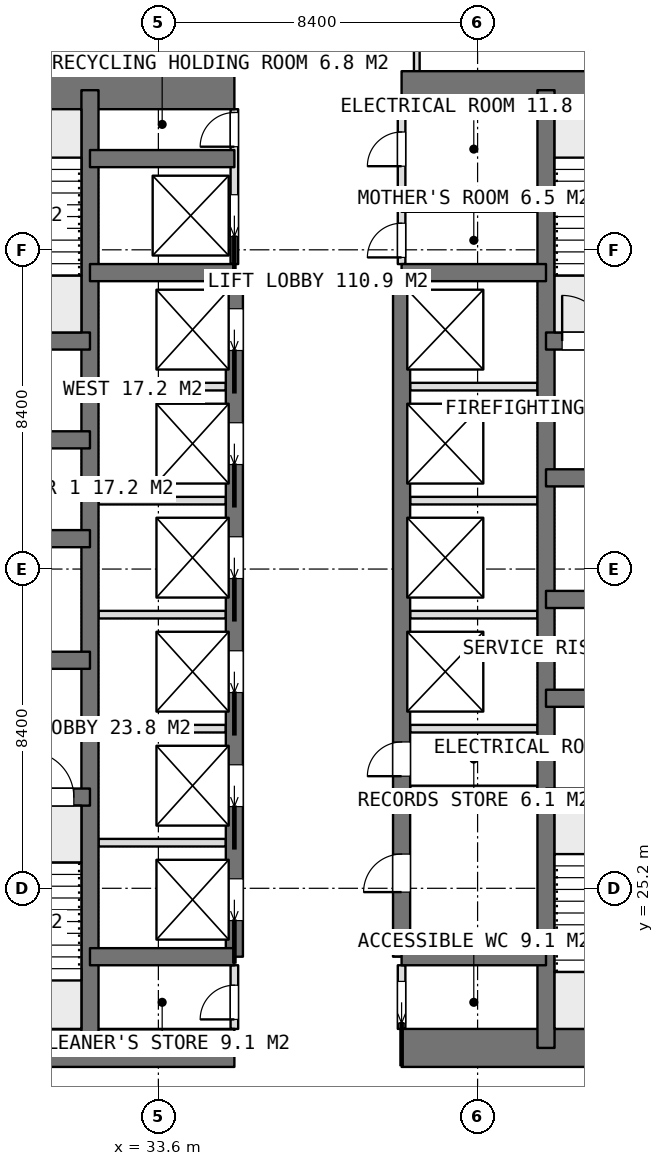
"""IFC4 building model, lengths in metres.
Left out: names, types, materials, properties, quantities, classifications, styles, units other than length and angle.
Written with IfcOpenShell. Run it as: python <this file> out.ifc"""

import sys

from ifc_helpers import new_model, si_unit, direction, frame, frame_2d, origin, place, context, subcontext, project, spatial, rectangle, extrude, element, fill, save


model = new_model("IFC4")
c1 = context("Model", 3, precision=1e-05, world=origin(), true_north=direction((0.0, 1.0)))
c2 = subcontext(c1, "Body", "Model", "MODEL_VIEW")
j1 = project(units=[si_unit("LENGTHUNIT", "METRE"), si_unit("PLANEANGLEUNIT", "RADIAN")], contexts=[c1])
p1 = place(None, origin())
s1 = spatial("IfcSite", under=j1, at=p1, CompositionType="ELEMENT")
p2 = place(p1, origin())
s2 = spatial("IfcBuilding", under=s1, at=p2, CompositionType="ELEMENT")
p3 = place(p2, frame((0.0, 0.0, 121.55)))
s3 = spatial("IfcBuildingStorey", under=s2, at=p3, CompositionType="ELEMENT", Elevation=121.55)
p4 = place(p3, frame((25.2, 21.0, 0.0), z_axis=(0.0, 0.0, 1.0), x_axis=(1.0, 0.0, 0.0)))
e1 = element("IfcWall", 1, at=p4, inside=s3, PredefinedType="SHEAR", context=c2, shape_type="SweptSolid", body=[
    extrude(rectangle(XDim=10.4, YDim=1.0, at=frame_2d((5.2, 0.0))), origin(), (0.0, 0.0, 1.0), 3.75),
])
p5 = place(p3, frame((40.0, 21.0, 0.0), z_axis=(0.0, 0.0, 1.0), x_axis=(1.0, 0.0, 0.0)))
e2 = element("IfcWall", 2, at=p5, inside=s3, PredefinedType="SHEAR", context=c2, shape_type="SweptSolid", body=[
    extrude(rectangle(XDim=10.4, YDim=1.0, at=frame_2d((5.2, 0.0))), origin(), (0.0, 0.0, 1.0), 3.75),
])
p6 = place(p3, frame((25.2, 46.2, 0.0), z_axis=(0.0, 0.0, 1.0), x_axis=(1.0, 0.0, 0.0)))
e3 = element("IfcWall", 3, at=p6, inside=s3, PredefinedType="SHEAR", context=c2, shape_type="SweptSolid", body=[
    extrude(rectangle(XDim=10.4, YDim=1.0, at=frame_2d((5.2, 0.0))), origin(), (0.0, 0.0, 1.0), 3.75),
])
p7 = place(p3, frame((40.0, 46.2, 0.0), z_axis=(0.0, 0.0, 1.0), x_axis=(1.0, 0.0, 0.0)))
e4 = element("IfcWall", 4, at=p7, inside=s3, PredefinedType="SHEAR", context=c2, shape_type="SweptSolid", body=[
    extrude(rectangle(XDim=10.4, YDim=1.0, at=frame_2d((5.2, 0.0))), origin(), (0.0, 0.0, 1.0), 3.75),
])
for number, where, z_axis, x_axis in (
    (5, (31.8, 21.0, 0.0), (0.0, 0.0, 1.0), (0.0, 1.0, 0.0)),
    (6, (43.8, 21.0, 0.0), (0.0, 0.0, 1.0), (0.0, 1.0, 0.0)),
):
    element("IfcWall", number, at=place(p3, frame(where, z_axis=z_axis, x_axis=x_axis)), inside=s3, PredefinedType="SHEAR", context=c2, shape_type="SweptSolid", body=[
        extrude(rectangle(XDim=25.2, YDim=0.45, at=frame_2d((12.6, 0.0))), origin(), (0.0, 0.0, 1.0), 3.75),
    ])
p8 = place(p3, frame((35.6, 23.4, 0.0), z_axis=(0.0, 0.0, 1.0), x_axis=(0.0, 1.0, 0.0)))
e7 = element("IfcWall", 7, at=p8, inside=s3, PredefinedType="SHEAR", context=c2, shape_type="SweptSolid", body=[
    extrude(rectangle(XDim=18.0, YDim=0.45, at=frame_2d((9.0, 0.0))), origin(), (0.0, 0.0, 1.0), 3.75),
])
p9 = place(p8, frame((0.95, 0.0, 0.0)))
e8 = element("IfcOpeningElement", 8, at=p9, cuts=e7, PredefinedType="OPENING", context=c2, shape_type="SweptSolid", body=[
    extrude(rectangle(XDim=1.1, YDim=2.1, at=frame_2d((0.55, 1.05))), frame((0.0, 0.235, 0.0), z_axis=(0.0, -1.0, 0.0), x_axis=(1.0, 0.0, 0.0)), (0.0, 0.0, 1.0), 0.47),
])
p10 = place(p8, frame((3.95, 0.0, 0.0)))
e9 = element("IfcOpeningElement", 9, at=p10, cuts=e7, PredefinedType="OPENING", context=c2, shape_type="SweptSolid", body=[
    extrude(rectangle(XDim=1.1, YDim=2.1, at=frame_2d((0.55, 1.05))), frame((0.0, 0.235, 0.0), z_axis=(0.0, -1.0, 0.0), x_axis=(1.0, 0.0, 0.0)), (0.0, 0.0, 1.0), 0.47),
])
p11 = place(p8, frame((6.95, 0.0, 0.0)))
e10 = element("IfcOpeningElement", 10, at=p11, cuts=e7, PredefinedType="OPENING", context=c2, shape_type="SweptSolid", body=[
    extrude(rectangle(XDim=1.1, YDim=2.1, at=frame_2d((0.55, 1.05))), frame((0.0, 0.235, 0.0), z_axis=(0.0, -1.0, 0.0), x_axis=(1.0, 0.0, 0.0)), (0.0, 0.0, 1.0), 0.47),
])
p12 = place(p8, frame((9.95, 0.0, 0.0)))
e11 = element("IfcOpeningElement", 11, at=p12, cuts=e7, PredefinedType="OPENING", context=c2, shape_type="SweptSolid", body=[
    extrude(rectangle(XDim=1.1, YDim=2.1, at=frame_2d((0.55, 1.05))), frame((0.0, 0.235, 0.0), z_axis=(0.0, -1.0, 0.0), x_axis=(1.0, 0.0, 0.0)), (0.0, 0.0, 1.0), 0.47),
])
p13 = place(p8, frame((12.95, 0.0, 0.0)))
e12 = element("IfcOpeningElement", 12, at=p13, cuts=e7, PredefinedType="OPENING", context=c2, shape_type="SweptSolid", body=[
    extrude(rectangle(XDim=1.1, YDim=2.1, at=frame_2d((0.55, 1.05))), frame((0.0, 0.235, 0.0), z_axis=(0.0, -1.0, 0.0), x_axis=(1.0, 0.0, 0.0)), (0.0, 0.0, 1.0), 0.47),
])
p14 = place(p8, frame((15.95, 0.0, 0.0)))
e13 = element("IfcOpeningElement", 13, at=p14, cuts=e7, PredefinedType="OPENING", context=c2, shape_type="SweptSolid", body=[
    extrude(rectangle(XDim=1.1, YDim=2.1, at=frame_2d((0.55, 1.05))), frame((0.0, 0.235, 0.0), z_axis=(0.0, -1.0, 0.0), x_axis=(1.0, 0.0, 0.0)), (0.0, 0.0, 1.0), 0.47),
])
p15 = place(p3, frame((40.0, 23.4, 0.0), z_axis=(0.0, 0.0, 1.0), x_axis=(0.0, 1.0, 0.0)))
e14 = element("IfcWall", 14, at=p15, inside=s3, PredefinedType="SHEAR", context=c2, shape_type="SweptSolid", body=[
    extrude(rectangle(XDim=18.0, YDim=0.45, at=frame_2d((9.0, 0.0))), origin(), (0.0, 0.0, 1.0), 3.75),
])
p16 = place(p15, frame((1.7, 0.0, 0.0)))
e15 = element("IfcOpeningElement", 15, at=p16, cuts=e14, PredefinedType="OPENING", context=c2, shape_type="SweptSolid", body=[
    extrude(rectangle(XDim=1.0, YDim=2.1, at=frame_2d((0.5, 1.05))), frame((0.0, 0.235, 0.0), z_axis=(0.0, -1.0, 0.0), x_axis=(1.0, 0.0, 0.0)), (0.0, 0.0, 1.0), 0.47),
])
p17 = place(p15, frame((4.75, 0.0, 0.0)))
e16 = element("IfcOpeningElement", 16, at=p17, cuts=e14, PredefinedType="OPENING", context=c2, shape_type="SweptSolid", body=[
    extrude(rectangle(XDim=0.9, YDim=2.1, at=frame_2d((0.45, 1.05))), frame((0.0, 0.235, 0.0), z_axis=(0.0, -1.0, 0.0), x_axis=(1.0, 0.0, 0.0)), (0.0, 0.0, 1.0), 0.47),
])
for number, where, z_axis, x_axis in (
    (17, (31.8, 23.4, 0.0), (0.0, 0.0, 1.0), (1.0, 0.0, 0.0)),
    (18, (31.8, 41.4, 0.0), (0.0, 0.0, 1.0), (1.0, 0.0, 0.0)),
    (19, (31.8, 44.4, 0.0), (0.0, 0.0, 1.0), (1.0, 0.0, 0.0)),
    (20, (40.0, 23.4, 0.0), (0.0, 0.0, 1.0), (1.0, 0.0, 0.0)),
    (21, (40.0, 41.4, 0.0), (0.0, 0.0, 1.0), (1.0, 0.0, 0.0)),
):
    element("IfcWall", number, at=place(p3, frame(where, z_axis=z_axis, x_axis=x_axis)), inside=s3, PredefinedType="SHEAR", context=c2, shape_type="SweptSolid", body=[
        extrude(rectangle(XDim=3.8, YDim=0.45, at=frame_2d((1.9, 0.0))), origin(), (0.0, 0.0, 1.0), 3.75),
    ])
p18 = place(p3, frame((25.2, 27.6, 0.0), z_axis=(0.0, 0.0, 1.0), x_axis=(1.0, 0.0, 0.0)))
e22 = element("IfcWall", 22, at=p18, inside=s3, PredefinedType="SHEAR", context=c2, shape_type="SweptSolid", body=[
    extrude(rectangle(XDim=6.6, YDim=0.45, at=frame_2d((3.3, 0.0))), origin(), (0.0, 0.0, 1.0), 3.75),
])
p19 = place(p18, frame((4.975, 0.0, 0.0)))
e23 = element("IfcOpeningElement", 23, at=p19, cuts=e22, PredefinedType="OPENING", context=c2, shape_type="SweptSolid", body=[
    extrude(rectangle(XDim=1.2, YDim=2.1, at=frame_2d((0.6, 1.05))), frame((0.0, 0.235, 0.0), z_axis=(0.0, -1.0, 0.0), x_axis=(1.0, 0.0, 0.0)), (0.0, 0.0, 1.0), 0.47),
])
p20 = place(p3, frame((25.2, 31.2, 0.0), z_axis=(0.0, 0.0, 1.0), x_axis=(1.0, 0.0, 0.0)))
e24 = element("IfcWall", 24, at=p20, inside=s3, PredefinedType="SHEAR", context=c2, shape_type="SweptSolid", body=[
    extrude(rectangle(XDim=6.6, YDim=0.45, at=frame_2d((3.3, 0.0))), origin(), (0.0, 0.0, 1.0), 3.75),
])
p21 = place(p20, frame((2.65, 0.0, 0.0)))
e25 = element("IfcOpeningElement", 25, at=p21, cuts=e24, PredefinedType="OPENING", context=c2, shape_type="SweptSolid", body=[
    extrude(rectangle(XDim=1.3, YDim=2.1, at=frame_2d((0.65, 1.05))), frame((0.0, 0.235, 0.0), z_axis=(0.0, -1.0, 0.0), x_axis=(1.0, 0.0, 0.0)), (0.0, 0.0, 1.0), 0.47),
])
for number, where, z_axis, x_axis in (
    (26, (25.2, 34.4, 0.0), (0.0, 0.0, 1.0), (1.0, 0.0, 0.0)),
    (27, (25.2, 37.0, 0.0), (0.0, 0.0, 1.0), (1.0, 0.0, 0.0)),
    (28, (25.2, 39.6, 0.0), (0.0, 0.0, 1.0), (1.0, 0.0, 0.0)),
):
    element("IfcWall", number, at=place(p3, frame(where, z_axis=z_axis, x_axis=x_axis)), inside=s3, PredefinedType="SHEAR", context=c2, shape_type="SweptSolid", body=[
        extrude(rectangle(XDim=6.6, YDim=0.45, at=frame_2d((3.3, 0.0))), origin(), (0.0, 0.0, 1.0), 3.75),
    ])
for number, where, z_axis, x_axis in (
    (29, (43.8, 27.6, 0.0), (0.0, 0.0, 1.0), (1.0, 0.0, 0.0)),
    (30, (43.8, 30.2, 0.0), (0.0, 0.0, 1.0), (1.0, 0.0, 0.0)),
    (31, (43.8, 32.8, 0.0), (0.0, 0.0, 1.0), (1.0, 0.0, 0.0)),
):
    element("IfcWall", number, at=place(p3, frame(where, z_axis=z_axis, x_axis=x_axis)), inside=s3, PredefinedType="SHEAR", context=c2, shape_type="SweptSolid", body=[
        extrude(rectangle(XDim=6.6, YDim=0.45, at=frame_2d((3.3, 0.0))), origin(), (0.0, 0.0, 1.0), 3.75),
    ])
p22 = place(p3, frame((43.8, 36.0, 0.0), z_axis=(0.0, 0.0, 1.0), x_axis=(1.0, 0.0, 0.0)))
e32 = element("IfcWall", 32, at=p22, inside=s3, PredefinedType="SHEAR", context=c2, shape_type="SweptSolid", body=[
    extrude(rectangle(XDim=6.6, YDim=0.45, at=frame_2d((3.3, 0.0))), origin(), (0.0, 0.0, 1.0), 3.75),
])
p23 = place(p22, frame((2.65, 0.0, 0.0)))
e33 = element("IfcOpeningElement", 33, at=p23, cuts=e32, PredefinedType="OPENING", context=c2, shape_type="SweptSolid", body=[
    extrude(rectangle(XDim=1.3, YDim=2.1, at=frame_2d((0.65, 1.05))), frame((0.0, 0.235, 0.0), z_axis=(0.0, -1.0, 0.0), x_axis=(1.0, 0.0, 0.0)), (0.0, 0.0, 1.0), 0.47),
])
p24 = place(p3, frame((43.8, 39.6, 0.0), z_axis=(0.0, 0.0, 1.0), x_axis=(1.0, 0.0, 0.0)))
e34 = element("IfcWall", 34, at=p24, inside=s3, PredefinedType="SHEAR", context=c2, shape_type="SweptSolid", body=[
    extrude(rectangle(XDim=6.6, YDim=0.45, at=frame_2d((3.3, 0.0))), origin(), (0.0, 0.0, 1.0), 3.75),
])
p25 = place(p24, frame((0.425, 0.0, 0.0)))
e35 = element("IfcOpeningElement", 35, at=p25, cuts=e34, PredefinedType="OPENING", context=c2, shape_type="SweptSolid", body=[
    extrude(rectangle(XDim=1.2, YDim=2.1, at=frame_2d((0.6, 1.05))), frame((0.0, 0.235, 0.0), z_axis=(0.0, -1.0, 0.0), x_axis=(1.0, 0.0, 0.0)), (0.0, 0.0, 1.0), 0.47),
])
for number, where, z_axis, x_axis in (
    (36, (32.025, 26.4, 0.0), (0.0, 0.0, 1.0), (1.0, 0.0, 0.0)),
    (37, (32.025, 29.4, 0.0), (0.0, 0.0, 1.0), (1.0, 0.0, 0.0)),
    (38, (32.025, 32.4, 0.0), (0.0, 0.0, 1.0), (1.0, 0.0, 0.0)),
    (39, (32.025, 35.4, 0.0), (0.0, 0.0, 1.0), (1.0, 0.0, 0.0)),
    (40, (32.025, 38.4, 0.0), (0.0, 0.0, 1.0), (1.0, 0.0, 0.0)),
):
    element("IfcWall", number, at=place(p3, frame(where, z_axis=z_axis, x_axis=x_axis)), inside=s3, PredefinedType="PARTITIONING", context=c2, shape_type="SweptSolid", body=[
        extrude(rectangle(XDim=3.35, YDim=0.2, at=frame_2d((1.675, 0.0))), origin(), (0.0, 0.0, 1.0), 3.5),
    ])
for number, where, z_axis, x_axis in (
    (41, (40.225, 29.4, 0.0), (0.0, 0.0, 1.0), (1.0, 0.0, 0.0)),
    (42, (40.225, 32.4, 0.0), (0.0, 0.0, 1.0), (1.0, 0.0, 0.0)),
    (43, (40.225, 35.4, 0.0), (0.0, 0.0, 1.0), (1.0, 0.0, 0.0)),
    (44, (40.225, 38.4, 0.0), (0.0, 0.0, 1.0), (1.0, 0.0, 0.0)),
):
    element("IfcWall", number, at=place(p3, frame(where, z_axis=z_axis, x_axis=x_axis)), inside=s3, PredefinedType="PARTITIONING", context=c2, shape_type="SweptSolid", body=[
        extrude(rectangle(XDim=3.35, YDim=0.2, at=frame_2d((1.675, 0.0))), origin(), (0.0, 0.0, 1.0), 3.5),
    ])
p26 = place(p3, frame((40.0, 21.5, 0.0), z_axis=(0.0, 0.0, 1.0), x_axis=(0.0, 1.0, 0.0)))
e45 = element("IfcWall", 45, at=p26, inside=s3, PredefinedType="PARTITIONING", context=c2, shape_type="SweptSolid", body=[
    extrude(rectangle(XDim=1.675, YDim=0.2, at=frame_2d((0.837, 0.0))), origin(), (0.0, 0.0, 1.0), 3.5),
])
p27 = place(p26, frame((0.15, 0.0, 0.0)))
e46 = element("IfcOpeningElement", 46, at=p27, cuts=e45, PredefinedType="OPENING", context=c2, shape_type="SweptSolid", body=[
    extrude(rectangle(XDim=1.1, YDim=2.1, at=frame_2d((0.55, 1.05))), frame((0.0, 0.11, 0.0), z_axis=(0.0, -1.0, 0.0), x_axis=(1.0, 0.0, 0.0)), (0.0, 0.0, 1.0), 0.22),
])
p28 = place(p3, frame((40.0, 41.625, 0.0), z_axis=(0.0, 0.0, 1.0), x_axis=(0.0, 1.0, 0.0)))
e47 = element("IfcWall", 47, at=p28, inside=s3, PredefinedType="PARTITIONING", context=c2, shape_type="SweptSolid", body=[
    extrude(rectangle(XDim=4.075, YDim=0.2, at=frame_2d((2.038, 0.0))), origin(), (0.0, 0.0, 1.0), 3.5),
])
p29 = place(p28, frame((2.575, 0.0, 0.0)))
e48 = element("IfcOpeningElement", 48, at=p29, cuts=e47, PredefinedType="OPENING", context=c2, shape_type="SweptSolid", body=[
    extrude(rectangle(XDim=0.9, YDim=2.1, at=frame_2d((0.45, 1.05))), frame((0.0, 0.11, 0.0), z_axis=(0.0, -1.0, 0.0), x_axis=(1.0, 0.0, 0.0)), (0.0, 0.0, 1.0), 0.22),
])
p30 = place(p28, frame((0.175, 0.0, 0.0)))
e49 = element("IfcOpeningElement", 49, at=p30, cuts=e47, PredefinedType="OPENING", context=c2, shape_type="SweptSolid", body=[
    extrude(rectangle(XDim=0.9, YDim=2.1, at=frame_2d((0.45, 1.05))), frame((0.0, 0.11, 0.0), z_axis=(0.0, -1.0, 0.0), x_axis=(1.0, 0.0, 0.0)), (0.0, 0.0, 1.0), 0.22),
])
p31 = place(p3, frame((35.6, 41.625, 0.0), z_axis=(0.0, 0.0, 1.0), x_axis=(0.0, 1.0, 0.0)))
e50 = element("IfcWall", 50, at=p31, inside=s3, PredefinedType="PARTITIONING", context=c2, shape_type="SweptSolid", body=[
    extrude(rectangle(XDim=4.075, YDim=0.2, at=frame_2d((2.038, 0.0))), origin(), (0.0, 0.0, 1.0), 3.5),
])
p32 = place(p31, frame((3.088, 0.0, 0.0)))
e51 = element("IfcOpeningElement", 51, at=p32, cuts=e50, PredefinedType="OPENING", context=c2, shape_type="SweptSolid", body=[
    extrude(rectangle(XDim=0.9, YDim=2.1, at=frame_2d((0.45, 1.05))), frame((0.0, 0.11, 0.0), z_axis=(0.0, -1.0, 0.0), x_axis=(1.0, 0.0, 0.0)), (0.0, 0.0, 1.0), 0.22),
])
p33 = place(p31, frame((0.725, 0.0, 0.0)))
e52 = element("IfcOpeningElement", 52, at=p33, cuts=e50, PredefinedType="OPENING", context=c2, shape_type="SweptSolid", body=[
    extrude(rectangle(XDim=1.1, YDim=2.1, at=frame_2d((0.55, 1.05))), frame((0.0, 0.11, 0.0), z_axis=(0.0, -1.0, 0.0), x_axis=(1.0, 0.0, 0.0)), (0.0, 0.0, 1.0), 0.22),
])
p34 = place(p3, frame((35.6, 21.5, 0.0), z_axis=(0.0, 0.0, 1.0), x_axis=(0.0, 1.0, 0.0)))
e53 = element("IfcWall", 53, at=p34, inside=s3, PredefinedType="PARTITIONING", context=c2, shape_type="SweptSolid", body=[
    extrude(rectangle(XDim=1.675, YDim=0.2, at=frame_2d((0.837, 0.0))), origin(), (0.0, 0.0, 1.0), 3.5),
])
p35 = place(p34, frame((0.25, 0.0, 0.0)))
e54 = element("IfcOpeningElement", 54, at=p35, cuts=e53, PredefinedType="OPENING", context=c2, shape_type="SweptSolid", body=[
    extrude(rectangle(XDim=0.9, YDim=2.1, at=frame_2d((0.45, 1.05))), frame((0.0, 0.11, 0.0), z_axis=(0.0, -1.0, 0.0), x_axis=(1.0, 0.0, 0.0)), (0.0, 0.0, 1.0), 0.22),
])
p36 = place(p3, frame((40.225, 27.8, 0.0), z_axis=(0.0, 0.0, 1.0), x_axis=(1.0, 0.0, 0.0)))
e55 = element("IfcWall", 55, at=p36, inside=s3, PredefinedType="PARTITIONING", context=c2, shape_type="SweptSolid", body=[
    extrude(rectangle(XDim=3.35, YDim=0.2, at=frame_2d((1.675, 0.0))), origin(), (0.0, 0.0, 1.0), 3.5),
])
p37 = place(p3, frame((40.0, 43.1, 0.0), z_axis=(0.0, 0.0, 1.0), x_axis=(1.0, 0.0, 0.0)))
e56 = element("IfcWall", 56, at=p37, inside=s3, PredefinedType="PARTITIONING", context=c2, shape_type="SweptSolid", body=[
    extrude(rectangle(XDim=3.575, YDim=0.2, at=frame_2d((1.788, 0.0))), origin(), (0.0, 0.0, 1.0), 3.5),
])
for number, where, z_axis, x_axis in (
    (57, (40.4, 46.7, 0.0), (0.0, 0.0, 1.0), (0.0, 1.0, 0.0)),
    (58, (35.2, 46.7, 0.0), (0.0, 0.0, 1.0), (0.0, 1.0, 0.0)),
):
    element("IfcWall", number, at=place(p3, frame(where, z_axis=z_axis, x_axis=x_axis)), inside=s3, PredefinedType="PARTITIONING", context=c2, shape_type="SweptSolid", body=[
        extrude(rectangle(XDim=2.625, YDim=0.15, at=frame_2d((1.312, 0.0))), origin(), (0.0, 0.0, 1.0), 3.5),
    ])
p38 = place(p27, origin())
e59 = element("IfcDoor", 59, at=p38, inside=s3, OperationType="SLIDING_TO_LEFT", PredefinedType="DOOR", context=c2, shape_type="SweptSolid", body=[
    extrude(rectangle(XDim=1.1, YDim=2.1, at=frame_2d((0.55, 1.05))), frame((0.0, 0.025, 0.0), z_axis=(0.0, -1.0, 0.0), x_axis=(1.0, 0.0, 0.0)), (0.0, 0.0, 1.0), 0.05),
])
fill(e46, e59)
p39 = place(p35, origin())
e60 = element("IfcDoor", 60, at=p39, inside=s3, OperationType="SINGLE_SWING_LEFT", PredefinedType="DOOR", context=c2, shape_type="SweptSolid", body=[
    extrude(rectangle(XDim=0.9, YDim=2.1, at=frame_2d((0.45, 1.05))), frame((0.0, 0.025, 0.0), z_axis=(0.0, -1.0, 0.0), x_axis=(1.0, 0.0, 0.0)), (0.0, 0.0, 1.0), 0.05),
])
fill(e54, e60)
p40 = place(p29, origin())
e61 = element("IfcDoor", 61, at=p40, inside=s3, OperationType="SINGLE_SWING_LEFT", PredefinedType="DOOR", context=c2, shape_type="SweptSolid", body=[
    extrude(rectangle(XDim=0.9, YDim=2.1, at=frame_2d((0.45, 1.05))), frame((0.0, 0.025, 0.0), z_axis=(0.0, -1.0, 0.0), x_axis=(1.0, 0.0, 0.0)), (0.0, 0.0, 1.0), 0.05),
])
fill(e48, e61)
p41 = place(p30, origin())
e62 = element("IfcDoor", 62, at=p41, inside=s3, OperationType="SINGLE_SWING_LEFT", PredefinedType="DOOR", context=c2, shape_type="SweptSolid", body=[
    extrude(rectangle(XDim=0.9, YDim=2.1, at=frame_2d((0.45, 1.05))), frame((0.0, 0.025, 0.0), z_axis=(0.0, -1.0, 0.0), x_axis=(1.0, 0.0, 0.0)), (0.0, 0.0, 1.0), 0.05),
])
fill(e49, e62)
p42 = place(p16, origin())
e63 = element("IfcDoor", 63, at=p42, inside=s3, OperationType="SINGLE_SWING_LEFT", PredefinedType="DOOR", context=c2, shape_type="SweptSolid", body=[
    extrude(rectangle(XDim=1.0, YDim=2.1, at=frame_2d((0.5, 1.05))), frame((0.0, 0.025, 0.0), z_axis=(0.0, -1.0, 0.0), x_axis=(1.0, 0.0, 0.0)), (0.0, 0.0, 1.0), 0.05),
])
fill(e15, e63)
p43 = place(p17, origin())
e64 = element("IfcDoor", 64, at=p43, inside=s3, OperationType="SINGLE_SWING_LEFT", PredefinedType="DOOR", context=c2, shape_type="SweptSolid", body=[
    extrude(rectangle(XDim=0.9, YDim=2.1, at=frame_2d((0.45, 1.05))), frame((0.0, 0.025, 0.0), z_axis=(0.0, -1.0, 0.0), x_axis=(1.0, 0.0, 0.0)), (0.0, 0.0, 1.0), 0.05),
])
fill(e16, e64)
p44 = place(p32, origin())
e65 = element("IfcDoor", 65, at=p44, inside=s3, OperationType="SINGLE_SWING_LEFT", PredefinedType="DOOR", context=c2, shape_type="SweptSolid", body=[
    extrude(rectangle(XDim=0.9, YDim=2.1, at=frame_2d((0.45, 1.05))), frame((0.0, 0.025, 0.0), z_axis=(0.0, -1.0, 0.0), x_axis=(1.0, 0.0, 0.0)), (0.0, 0.0, 1.0), 0.05),
])
fill(e51, e65)
p45 = place(p9, origin())
e66 = element("IfcDoor", 66, at=p45, inside=s3, OperationType="SLIDING_TO_LEFT", PredefinedType="USERDEFINED", context=c2, shape_type="SweptSolid", body=[
    extrude(rectangle(XDim=1.1, YDim=2.1, at=frame_2d((0.55, 1.05))), frame((0.0, 0.025, 0.0), z_axis=(0.0, -1.0, 0.0), x_axis=(1.0, 0.0, 0.0)), (0.0, 0.0, 1.0), 0.05),
])
fill(e8, e66)
p46 = place(p10, origin())
e67 = element("IfcDoor", 67, at=p46, inside=s3, OperationType="SLIDING_TO_LEFT", PredefinedType="USERDEFINED", context=c2, shape_type="SweptSolid", body=[
    extrude(rectangle(XDim=1.1, YDim=2.1, at=frame_2d((0.55, 1.05))), frame((0.0, 0.025, 0.0), z_axis=(0.0, -1.0, 0.0), x_axis=(1.0, 0.0, 0.0)), (0.0, 0.0, 1.0), 0.05),
])
fill(e9, e67)
p47 = place(p11, origin())
e68 = element("IfcDoor", 68, at=p47, inside=s3, OperationType="SLIDING_TO_LEFT", PredefinedType="USERDEFINED", context=c2, shape_type="SweptSolid", body=[
    extrude(rectangle(XDim=1.1, YDim=2.1, at=frame_2d((0.55, 1.05))), frame((0.0, 0.025, 0.0), z_axis=(0.0, -1.0, 0.0), x_axis=(1.0, 0.0, 0.0)), (0.0, 0.0, 1.0), 0.05),
])
fill(e10, e68)
p48 = place(p12, origin())
e69 = element("IfcDoor", 69, at=p48, inside=s3, OperationType="SLIDING_TO_LEFT", PredefinedType="USERDEFINED", context=c2, shape_type="SweptSolid", body=[
    extrude(rectangle(XDim=1.1, YDim=2.1, at=frame_2d((0.55, 1.05))), frame((0.0, 0.025, 0.0), z_axis=(0.0, -1.0, 0.0), x_axis=(1.0, 0.0, 0.0)), (0.0, 0.0, 1.0), 0.05),
])
fill(e11, e69)
p49 = place(p13, origin())
e70 = element("IfcDoor", 70, at=p49, inside=s3, OperationType="SLIDING_TO_LEFT", PredefinedType="USERDEFINED", context=c2, shape_type="SweptSolid", body=[
    extrude(rectangle(XDim=1.1, YDim=2.1, at=frame_2d((0.55, 1.05))), frame((0.0, 0.025, 0.0), z_axis=(0.0, -1.0, 0.0), x_axis=(1.0, 0.0, 0.0)), (0.0, 0.0, 1.0), 0.05),
])
fill(e12, e70)
p50 = place(p14, origin())
e71 = element("IfcDoor", 71, at=p50, inside=s3, OperationType="SLIDING_TO_LEFT", PredefinedType="USERDEFINED", context=c2, shape_type="SweptSolid", body=[
    extrude(rectangle(XDim=1.1, YDim=2.1, at=frame_2d((0.55, 1.05))), frame((0.0, 0.025, 0.0), z_axis=(0.0, -1.0, 0.0), x_axis=(1.0, 0.0, 0.0)), (0.0, 0.0, 1.0), 0.05),
])
fill(e13, e71)
p51 = place(p33, origin())
e72 = element("IfcDoor", 72, at=p51, inside=s3, OperationType="SLIDING_TO_LEFT", PredefinedType="USERDEFINED", context=c2, shape_type="SweptSolid", body=[
    extrude(rectangle(XDim=1.1, YDim=2.1, at=frame_2d((0.55, 1.05))), frame((0.0, 0.025, 0.0), z_axis=(0.0, -1.0, 0.0), x_axis=(1.0, 0.0, 0.0)), (0.0, 0.0, 1.0), 0.05),
])
fill(e52, e72)
p52 = place(p19, origin())
e73 = element("IfcDoor", 73, at=p52, inside=s3, OperationType="SINGLE_SWING_RIGHT", PredefinedType="DOOR", context=c2, shape_type="SweptSolid", body=[
    extrude(rectangle(XDim=1.2, YDim=2.1, at=frame_2d((0.6, 1.05))), frame((0.0, 0.025, 0.0), z_axis=(0.0, -1.0, 0.0), x_axis=(1.0, 0.0, 0.0)), (0.0, 0.0, 1.0), 0.05),
])
fill(e23, e73)
p53 = place(p25, origin())
e74 = element("IfcDoor", 74, at=p53, inside=s3, OperationType="SINGLE_SWING_RIGHT", PredefinedType="DOOR", context=c2, shape_type="SweptSolid", body=[
    extrude(rectangle(XDim=1.2, YDim=2.1, at=frame_2d((0.6, 1.05))), frame((0.0, 0.025, 0.0), z_axis=(0.0, -1.0, 0.0), x_axis=(1.0, 0.0, 0.0)), (0.0, 0.0, 1.0), 0.05),
])
fill(e35, e74)
save(model, sys.argv[1])
